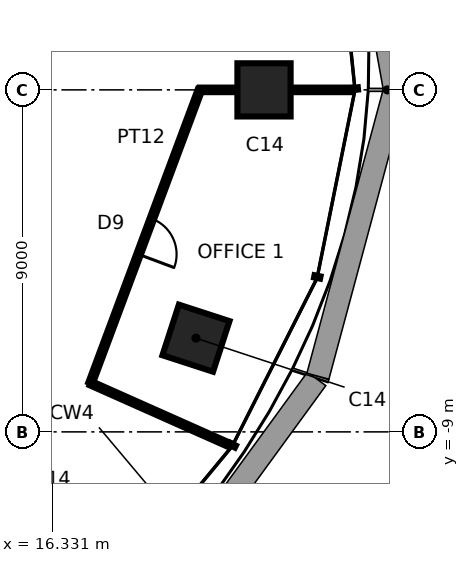
"""IFC4 building model, lengths in metres.
Left out: names, types, materials, properties, quantities, classifications, styles, units other than length and angle.
Written with IfcOpenShell. Run it as: python <this file> out.ifc"""

import sys

from ifc_helpers import new_model, si_unit, direction, frame, frame_2d, origin, origin_2d, place, context, subcontext, project, spatial, rectangle, extrude, element, fill, save


model = new_model("IFC4")
c1 = context("Model", 3, precision=1e-05, world=origin(), true_north=direction((0.0, 1.0)))
c2 = subcontext(c1, "Body", "Model", "MODEL_VIEW")
j1 = project(units=[si_unit("LENGTHUNIT", "METRE"), si_unit("PLANEANGLEUNIT", "RADIAN")], contexts=[c1])
p1 = place(None, origin())
s1 = spatial("IfcSite", under=j1, at=p1, CompositionType="ELEMENT")
p2 = place(p1, origin())
s2 = spatial("IfcBuilding", under=s1, at=p2, CompositionType="ELEMENT")
p3 = place(p2, frame((0.0, 0.0, 234.5)))
s3 = spatial("IfcBuildingStorey", under=s2, at=p3, CompositionType="ELEMENT", Elevation=234.5)
for number, where, z_axis, x_axis in (
    (1, (21.9, 0.0, 0.0), (0.0, 0.0, 1.0), (1.0, 0.0, 0.0)),
    (2, (20.109, -6.534, 0.0), (0.0, 0.0, 1.0), (0.951, -0.309, 0.0)),
):
    element("IfcColumn", number, at=place(p3, frame(where, z_axis=z_axis, x_axis=x_axis)), inside=s3, PredefinedType="COLUMN", context=c2, shape_type="SweptSolid", body=[
        extrude(rectangle(XDim=1.4, YDim=1.4, at=origin_2d()), origin(), (0.0, 0.0, 1.0), 3.9),
    ])
p4 = place(p3, frame((17.335, -7.718, 0.0), z_axis=(0.0, 0.0, 1.0), x_axis=(0.913549606868, -0.406727323635, 0.0)))
e3 = element("IfcWall", 3, at=p4, inside=s3, PredefinedType="PARTITIONING", context=c2, shape_type="SweptSolid", body=[
    extrude(rectangle(XDim=4.0, YDim=0.12, at=frame_2d((2.0, 0.0))), origin(), (0.0, 0.0, 1.0), 3.74),
])
p5 = place(p3, frame((20.214, 0.0, 0.0), z_axis=(0.0, 0.0, 1.0), x_axis=(-0.349541206964, -0.936920991671, 0.0)))
e4 = element("IfcWall", 4, at=p5, inside=s3, PredefinedType="PARTITIONING", context=c2, shape_type="SweptSolid", body=[
    extrude(rectangle(XDim=8.238, YDim=0.12, at=frame_2d((4.119, 0.0))), origin(), (0.0, 0.0, 1.0), 3.334),
])
p6 = place(p5, frame((3.619, 0.0, 0.0)))
e5 = element("IfcOpeningElement", 5, at=p6, cuts=e4, PredefinedType="OPENING", context=c2, shape_type="SweptSolid", body=[
    extrude(rectangle(XDim=1.0, YDim=2.4, at=frame_2d((0.5, 1.2))), frame((0.0, 0.07, 0.0), z_axis=(0.0, -1.0, 0.0), x_axis=(1.0, 0.0, 0.0)), (0.0, 0.0, 1.0), 0.14),
])
p7 = place(p3, frame((24.214, 0.0, 0.0), z_axis=(0.0, 0.0, 1.0), x_axis=(-1.0, 0.0, 0.0)))
e6 = element("IfcWall", 6, at=p7, inside=s3, PredefinedType="PARTITIONING", context=c2, shape_type="SweptSolid", body=[
    extrude(rectangle(XDim=4.0, YDim=0.12, at=frame_2d((2.0, 0.0))), origin(), (0.0, 0.0, 1.0), 3.04),
])
p8 = place(p6, origin())
e7 = element("IfcDoor", 7, at=p8, inside=s3, OperationType="SINGLE_SWING_RIGHT", PredefinedType="DOOR", context=c2, shape_type="SweptSolid", body=[
    extrude(rectangle(XDim=1.0, YDim=2.4, at=frame_2d((0.5, 1.2))), frame((0.0, 0.025, 0.0), z_axis=(0.0, -1.0, 0.0), x_axis=(1.0, 0.0, 0.0)), (0.0, 0.0, 1.0), 0.05),
])
fill(e5, e7)
save(model, sys.argv[1])
